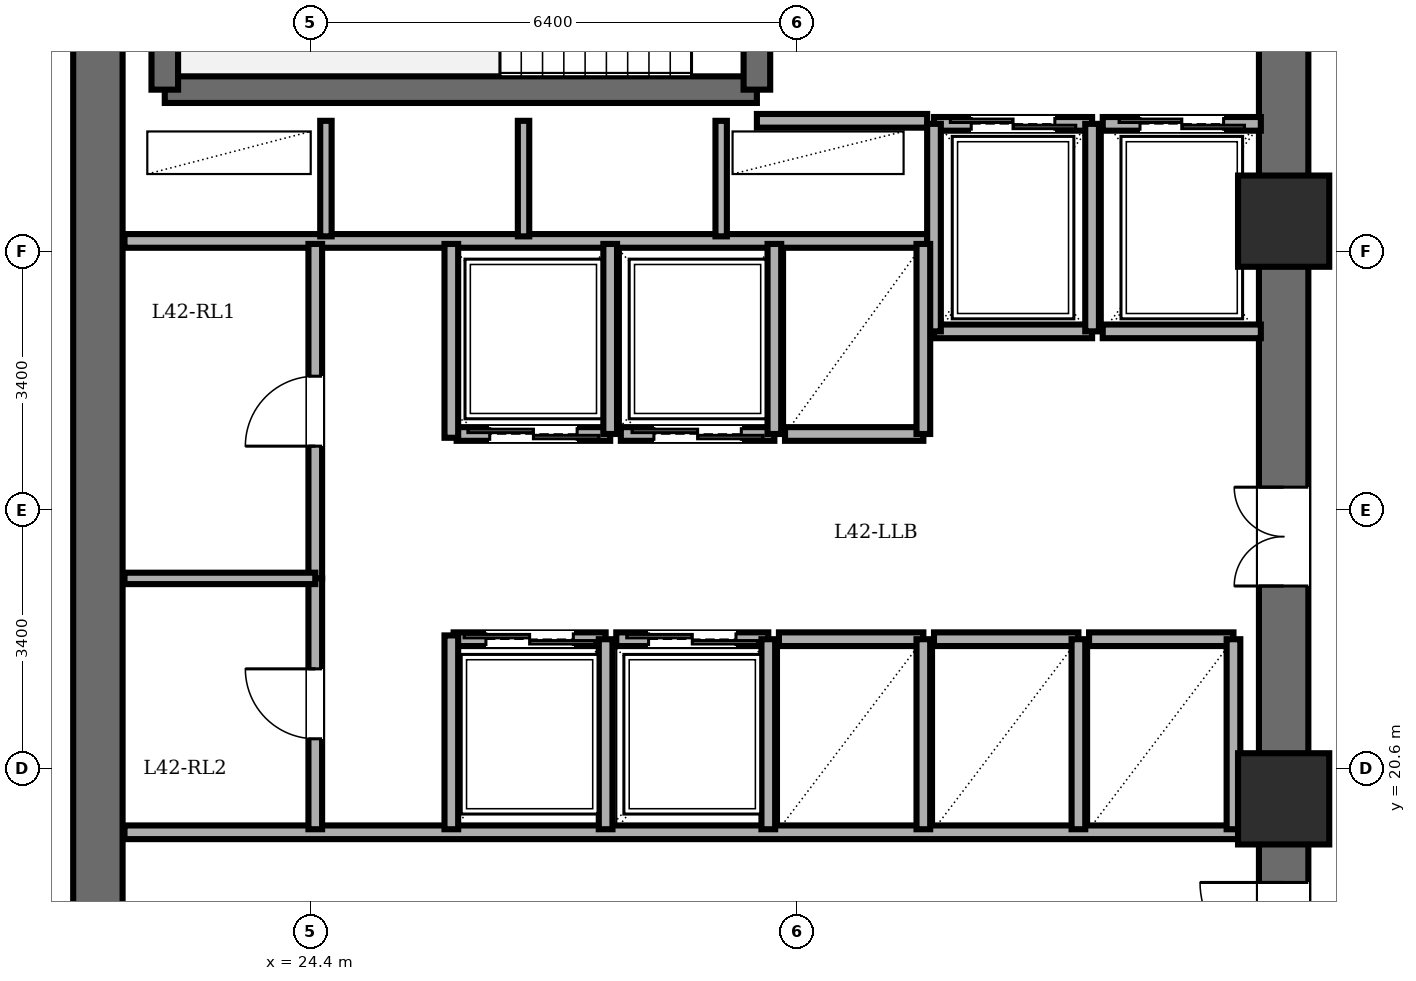
"""IFC4 building model, lengths in metres.
Left out: names, types, materials, properties, quantities, classifications, styles, units other than length and angle.
Written with IfcOpenShell. Run it as: python <this file> out.ifc"""

import sys

from ifc_helpers import new_model, si_unit, direction, frame, frame_2d, origin, origin_2d, place, context, subcontext, project, spatial, rectangle, extrude, element, fill, save


model = new_model("IFC4")
c1 = context("Model", 3, precision=1e-05, world=origin(), true_north=direction((0.0, 1.0)))
c2 = subcontext(c1, "Body", "Model", "MODEL_VIEW")
j1 = project(units=[si_unit("LENGTHUNIT", "METRE"), si_unit("PLANEANGLEUNIT", "RADIAN")], contexts=[c1])
p1 = place(None, origin())
s1 = spatial("IfcSite", under=j1, at=p1, CompositionType="ELEMENT")
p2 = place(p1, origin())
s2 = spatial("IfcBuilding", under=s1, at=p2, CompositionType="ELEMENT")
p3 = place(p2, frame((0.0, 0.0, 161.8)))
s3 = spatial("IfcBuildingStorey", under=s2, at=p3, CompositionType="ELEMENT", Elevation=161.8)
for number, where, z_axis, x_axis in (
    (1, (37.2, 20.2, 0.0), (0.0, 0.0, 1.0), (1.0, 0.0, 0.0)),
    (2, (37.2, 27.8, 0.0), (0.0, 0.0, 1.0), (1.0, 0.0, 0.0)),
):
    element("IfcColumn", number, at=place(p3, frame(where, z_axis=z_axis, x_axis=x_axis)), inside=s3, PredefinedType="COLUMN", context=c2, shape_type="SweptSolid", body=[
        extrude(rectangle(XDim=1.2, YDim=1.2, at=origin_2d()), origin(), (0.0, 0.0, 1.0), 3.6),
    ])
p4 = place(p3, frame((21.6, 14.4, 0.0), z_axis=(0.0, 0.0, 1.0), x_axis=(0.0, 1.0, 0.0)))
e3 = element("IfcWall", 3, at=p4, inside=s3, PredefinedType="SHEAR", context=c2, shape_type="SweptSolid", body=[
    extrude(rectangle(XDim=19.2, YDim=0.65, at=frame_2d((9.6, 0.0))), origin(), (0.0, 0.0, 1.0), 3.4),
])
p5 = place(p3, frame((37.2, 14.4, 0.0), z_axis=(0.0, 0.0, 1.0), x_axis=(0.0, 1.0, 0.0)))
e4 = element("IfcWall", 4, at=p5, inside=s3, PredefinedType="SHEAR", context=c2, shape_type="SweptSolid", body=[
    extrude(rectangle(XDim=19.2, YDim=0.65, at=frame_2d((9.6, 0.0))), origin(), (0.0, 0.0, 1.0), 3.4),
])
p6 = place(p5, frame((15.8, 0.0, 0.0)))
e5 = element("IfcOpeningElement", 5, at=p6, cuts=e4, PredefinedType="OPENING", context=c2, shape_type="SweptSolid", body=[
    extrude(rectangle(XDim=1.15, YDim=2.15, at=frame_2d((0.575, 1.075))), frame((0.0, 0.335, 0.0), z_axis=(0.0, -1.0, 0.0), x_axis=(1.0, 0.0, 0.0)), (0.0, 0.0, 1.0), 0.67),
])
p7 = place(p5, frame((3.6, 0.0, 0.0)))
e6 = element("IfcOpeningElement", 6, at=p7, cuts=e4, PredefinedType="OPENING", context=c2, shape_type="SweptSolid", body=[
    extrude(rectangle(XDim=1.1, YDim=2.15, at=frame_2d((0.55, 1.075))), frame((0.0, 0.335, 0.0), z_axis=(0.0, -1.0, 0.0), x_axis=(1.0, 0.0, 0.0)), (0.0, 0.0, 1.0), 0.67),
])
p8 = place(p5, frame((8.6, 0.0, 0.0)))
e7 = element("IfcOpeningElement", 7, at=p8, cuts=e4, PredefinedType="OPENING", context=c2, shape_type="SweptSolid", body=[
    extrude(rectangle(XDim=1.3, YDim=2.2, at=frame_2d((0.65, 1.1))), frame((0.0, 0.335, 0.0), z_axis=(0.0, -1.0, 0.0), x_axis=(1.0, 0.0, 0.0)), (0.0, 0.0, 1.0), 0.67),
])
p9 = place(p3, frame((22.48, 29.53, 0.0), z_axis=(0.0, 0.0, 1.0), x_axis=(1.0, 0.0, 0.0)))
e8 = element("IfcWall", 8, at=p9, inside=s3, PredefinedType="SOLIDWALL", context=c2, shape_type="SweptSolid", body=[
    extrude(rectangle(XDim=7.79, YDim=0.35, at=frame_2d((3.895, 0.0))), origin(), (0.0, 0.0, 1.0), 3.4),
])
p10 = place(p3, frame((22.48, 29.53, 0.0), z_axis=(0.0, 0.0, 1.0), x_axis=(0.0, 1.0, 0.0)))
e9 = element("IfcWall", 9, at=p10, inside=s3, PredefinedType="SOLIDWALL", context=c2, shape_type="SweptSolid", body=[
    extrude(rectangle(XDim=3.58, YDim=0.35, at=frame_2d((1.79, 0.0))), origin(), (0.0, 0.0, 1.0), 3.4),
])
p11 = place(p3, frame((30.27, 29.53, 0.0), z_axis=(0.0, 0.0, 1.0), x_axis=(0.0, 1.0, 0.0)))
e10 = element("IfcWall", 10, at=p11, inside=s3, PredefinedType="SOLIDWALL", context=c2, shape_type="SweptSolid", body=[
    extrude(rectangle(XDim=3.58, YDim=0.35, at=frame_2d((1.79, 0.0))), origin(), (0.0, 0.0, 1.0), 3.4),
])
p12 = place(p11, frame((1.25, 0.0, 0.0)))
e11 = element("IfcOpeningElement", 11, at=p12, cuts=e10, PredefinedType="OPENING", context=c2, shape_type="SweptSolid", body=[
    extrude(rectangle(XDim=1.1, YDim=2.15, at=frame_2d((0.55, 1.075))), frame((0.0, 0.185, 0.0), z_axis=(0.0, -1.0, 0.0), x_axis=(1.0, 0.0, 0.0)), (0.0, 0.0, 1.0), 0.37),
])
p13 = place(p3, frame((30.27, 29.12, 0.0), z_axis=(0.0, 0.0, 1.0), x_axis=(1.0, 0.0, 0.0)))
e12 = element("IfcWall", 12, at=p13, inside=s3, PredefinedType="PARTITIONING", context=c2, shape_type="SweptSolid", body=[
    extrude(rectangle(XDim=2.24, YDim=0.18, at=frame_2d((1.12, 0.0))), origin(), (0.0, 0.0, 1.0), 3.4),
])
p14 = place(p3, frame((21.95, 27.54, 0.0), z_axis=(0.0, 0.0, 1.0), x_axis=(1.0, 0.0, 0.0)))
e13 = element("IfcWall", 13, at=p14, inside=s3, PredefinedType="PARTITIONING", context=c2, shape_type="SweptSolid", body=[
    extrude(rectangle(XDim=10.56, YDim=0.18, at=frame_2d((5.28, 0.0))), origin(), (0.0, 0.0, 1.0), 3.4),
])
for number, where, z_axis, x_axis in (
    (14, (24.6, 27.6, 0.0), (0.0, 0.0, 1.0), (0.0, 1.0, 0.0)),
    (15, (27.2, 27.6, 0.0), (0.0, 0.0, 1.0), (0.0, 1.0, 0.0)),
    (16, (29.8, 27.6, 0.0), (0.0, 0.0, 1.0), (0.0, 1.0, 0.0)),
):
    element("IfcWall", number, at=place(p3, frame(where, z_axis=z_axis, x_axis=x_axis)), inside=s3, PredefinedType="PARTITIONING", context=c2, shape_type="SweptSolid", body=[
        extrude(rectangle(XDim=1.52, YDim=0.15, at=frame_2d((0.76, 0.0))), origin(), (0.0, 0.0, 1.0), 3.4),
    ])
p15 = place(p3, frame((21.95, 19.76, 0.0), z_axis=(0.0, 0.0, 1.0), x_axis=(1.0, 0.0, 0.0)))
e17 = element("IfcWall", 17, at=p15, inside=s3, PredefinedType="PARTITIONING", context=c2, shape_type="SweptSolid", body=[
    extrude(rectangle(XDim=14.87, YDim=0.18, at=frame_2d((7.435, 0.0))), origin(), (0.0, 0.0, 1.0), 3.4),
])
p16 = place(p3, frame((32.6, 29.08, 0.0), z_axis=(0.0, 0.0, 1.0), x_axis=(1.0, 0.0, 0.0)))
e18 = element("IfcWall", 18, at=p16, inside=s3, PredefinedType="PARTITIONING", context=c2, shape_type="SweptSolid", body=[
    extrude(rectangle(XDim=2.08, YDim=0.18, at=frame_2d((1.04, 0.0))), origin(), (0.0, 0.0, 1.0), 3.4),
])
p17 = place(p16, frame((0.49, 0.0, 0.0)))
e19 = element("IfcOpeningElement", 19, at=p17, cuts=e18, PredefinedType="OPENING", context=c2, shape_type="SweptSolid", body=[
    extrude(rectangle(XDim=1.1, YDim=2.2, at=frame_2d((0.55, 1.1))), frame((0.0, 0.1, 0.0), z_axis=(0.0, -1.0, 0.0), x_axis=(1.0, 0.0, 0.0)), (0.0, 0.0, 1.0), 0.2),
])
p18 = place(p3, frame((34.68, 26.35, 0.0), z_axis=(0.0, 0.0, 1.0), x_axis=(-1.0, 0.0, 0.0)))
e20 = element("IfcWall", 20, at=p18, inside=s3, PredefinedType="PARTITIONING", context=c2, shape_type="SweptSolid", body=[
    extrude(rectangle(XDim=2.08, YDim=0.18, at=frame_2d((1.04, 0.0))), origin(), (0.0, 0.0, 1.0), 3.4),
])
for number, where, z_axis, x_axis in (
    (21, (34.68, 26.35, 0.0), (0.0, 0.0, 1.0), (0.0, 1.0, 0.0)),
    (22, (32.6, 29.08, 0.0), (0.0, 0.0, 1.0), (0.0, -1.0, 0.0)),
):
    element("IfcWall", number, at=place(p3, frame(where, z_axis=z_axis, x_axis=x_axis)), inside=s3, PredefinedType="PARTITIONING", context=c2, shape_type="SweptSolid", body=[
        extrude(rectangle(XDim=2.73, YDim=0.18, at=frame_2d((1.365, 0.0))), origin(), (0.0, 0.0, 1.0), 3.4),
    ])
p19 = place(p3, frame((34.82, 29.08, 0.0), z_axis=(0.0, 0.0, 1.0), x_axis=(1.0, 0.0, 0.0)))
e23 = element("IfcWall", 23, at=p19, inside=s3, PredefinedType="PARTITIONING", context=c2, shape_type="SweptSolid", body=[
    extrude(rectangle(XDim=2.08, YDim=0.18, at=frame_2d((1.04, 0.0))), origin(), (0.0, 0.0, 1.0), 3.4),
])
p20 = place(p19, frame((0.49, 0.0, 0.0)))
e24 = element("IfcOpeningElement", 24, at=p20, cuts=e23, PredefinedType="OPENING", context=c2, shape_type="SweptSolid", body=[
    extrude(rectangle(XDim=1.1, YDim=2.2, at=frame_2d((0.55, 1.1))), frame((0.0, 0.1, 0.0), z_axis=(0.0, -1.0, 0.0), x_axis=(1.0, 0.0, 0.0)), (0.0, 0.0, 1.0), 0.2),
])
p21 = place(p3, frame((36.9, 26.35, 0.0), z_axis=(0.0, 0.0, 1.0), x_axis=(-1.0, 0.0, 0.0)))
e25 = element("IfcWall", 25, at=p21, inside=s3, PredefinedType="PARTITIONING", context=c2, shape_type="SweptSolid", body=[
    extrude(rectangle(XDim=2.08, YDim=0.18, at=frame_2d((1.04, 0.0))), origin(), (0.0, 0.0, 1.0), 3.4),
])
p22 = place(p3, frame((28.34, 25.0, 0.0), z_axis=(0.0, 0.0, 1.0), x_axis=(-1.0, 0.0, 0.0)))
e26 = element("IfcWall", 26, at=p22, inside=s3, PredefinedType="PARTITIONING", context=c2, shape_type="SweptSolid", body=[
    extrude(rectangle(XDim=2.02, YDim=0.18, at=frame_2d((1.01, 0.0))), origin(), (0.0, 0.0, 1.0), 3.4),
])
p23 = place(p22, frame((0.435, 0.0, 0.0)))
e27 = element("IfcOpeningElement", 27, at=p23, cuts=e26, PredefinedType="OPENING", context=c2, shape_type="SweptSolid", body=[
    extrude(rectangle(XDim=1.15, YDim=2.2, at=frame_2d((0.575, 1.1))), frame((0.0, 0.1, 0.0), z_axis=(0.0, -1.0, 0.0), x_axis=(1.0, 0.0, 0.0)), (0.0, 0.0, 1.0), 0.2),
])
p24 = place(p3, frame((28.34, 25.0, 0.0), z_axis=(0.0, 0.0, 1.0), x_axis=(0.0, 1.0, 0.0)))
e28 = element("IfcWall", 28, at=p24, inside=s3, PredefinedType="PARTITIONING", context=c2, shape_type="SweptSolid", body=[
    extrude(rectangle(XDim=2.5, YDim=0.18, at=frame_2d((1.25, 0.0))), origin(), (0.0, 0.0, 1.0), 3.4),
])
p25 = place(p3, frame((30.5, 25.0, 0.0), z_axis=(0.0, 0.0, 1.0), x_axis=(-1.0, 0.0, 0.0)))
e29 = element("IfcWall", 29, at=p25, inside=s3, PredefinedType="PARTITIONING", context=c2, shape_type="SweptSolid", body=[
    extrude(rectangle(XDim=2.02, YDim=0.18, at=frame_2d((1.01, 0.0))), origin(), (0.0, 0.0, 1.0), 3.4),
])
p26 = place(p25, frame((0.435, 0.0, 0.0)))
e30 = element("IfcOpeningElement", 30, at=p26, cuts=e29, PredefinedType="OPENING", context=c2, shape_type="SweptSolid", body=[
    extrude(rectangle(XDim=1.15, YDim=2.2, at=frame_2d((0.575, 1.1))), frame((0.0, 0.1, 0.0), z_axis=(0.0, -1.0, 0.0), x_axis=(1.0, 0.0, 0.0)), (0.0, 0.0, 1.0), 0.2),
])
p27 = place(p3, frame((30.5, 25.0, 0.0), z_axis=(0.0, 0.0, 1.0), x_axis=(0.0, 1.0, 0.0)))
e31 = element("IfcWall", 31, at=p27, inside=s3, PredefinedType="PARTITIONING", context=c2, shape_type="SweptSolid", body=[
    extrude(rectangle(XDim=2.5, YDim=0.18, at=frame_2d((1.25, 0.0))), origin(), (0.0, 0.0, 1.0), 3.4),
])
p28 = place(p3, frame((26.28, 22.3, 0.0), z_axis=(0.0, 0.0, 1.0), x_axis=(1.0, 0.0, 0.0)))
e32 = element("IfcWall", 32, at=p28, inside=s3, PredefinedType="PARTITIONING", context=c2, shape_type="SweptSolid", body=[
    extrude(rectangle(XDim=2.0, YDim=0.18, at=frame_2d((1.0, 0.0))), origin(), (0.0, 0.0, 1.0), 3.4),
])
p29 = place(p28, frame((0.425, 0.0, 0.0)))
e33 = element("IfcOpeningElement", 33, at=p29, cuts=e32, PredefinedType="OPENING", context=c2, shape_type="SweptSolid", body=[
    extrude(rectangle(XDim=1.15, YDim=2.2, at=frame_2d((0.575, 1.1))), frame((0.0, 0.1, 0.0), z_axis=(0.0, -1.0, 0.0), x_axis=(1.0, 0.0, 0.0)), (0.0, 0.0, 1.0), 0.2),
])
p30 = place(p3, frame((28.28, 19.8, 0.0), z_axis=(0.0, 0.0, 1.0), x_axis=(0.0, 1.0, 0.0)))
e34 = element("IfcWall", 34, at=p30, inside=s3, PredefinedType="PARTITIONING", context=c2, shape_type="SweptSolid", body=[
    extrude(rectangle(XDim=2.5, YDim=0.18, at=frame_2d((1.25, 0.0))), origin(), (0.0, 0.0, 1.0), 3.4),
])
p31 = place(p3, frame((28.42, 22.3, 0.0), z_axis=(0.0, 0.0, 1.0), x_axis=(1.0, 0.0, 0.0)))
e35 = element("IfcWall", 35, at=p31, inside=s3, PredefinedType="PARTITIONING", context=c2, shape_type="SweptSolid", body=[
    extrude(rectangle(XDim=2.0, YDim=0.18, at=frame_2d((1.0, 0.0))), origin(), (0.0, 0.0, 1.0), 3.4),
])
p32 = place(p31, frame((0.425, 0.0, 0.0)))
e36 = element("IfcOpeningElement", 36, at=p32, cuts=e35, PredefinedType="OPENING", context=c2, shape_type="SweptSolid", body=[
    extrude(rectangle(XDim=1.15, YDim=2.2, at=frame_2d((0.575, 1.1))), frame((0.0, 0.1, 0.0), z_axis=(0.0, -1.0, 0.0), x_axis=(1.0, 0.0, 0.0)), (0.0, 0.0, 1.0), 0.2),
])
p33 = place(p3, frame((30.42, 19.8, 0.0), z_axis=(0.0, 0.0, 1.0), x_axis=(0.0, 1.0, 0.0)))
e37 = element("IfcWall", 37, at=p33, inside=s3, PredefinedType="PARTITIONING", context=c2, shape_type="SweptSolid", body=[
    extrude(rectangle(XDim=2.5, YDim=0.18, at=frame_2d((1.25, 0.0))), origin(), (0.0, 0.0, 1.0), 3.4),
])
p34 = place(p3, frame((32.46, 25.0, 0.0), z_axis=(0.0, 0.0, 1.0), x_axis=(-1.0, 0.0, 0.0)))
e38 = element("IfcWall", 38, at=p34, inside=s3, PredefinedType="PARTITIONING", context=c2, shape_type="SweptSolid", body=[
    extrude(rectangle(XDim=1.82, YDim=0.18, at=frame_2d((0.91, 0.0))), origin(), (0.0, 0.0, 1.0), 3.4),
])
p35 = place(p3, frame((32.46, 25.0, 0.0), z_axis=(0.0, 0.0, 1.0), x_axis=(0.0, 1.0, 0.0)))
e39 = element("IfcWall", 39, at=p35, inside=s3, PredefinedType="PARTITIONING", context=c2, shape_type="SweptSolid", body=[
    extrude(rectangle(XDim=2.5, YDim=0.18, at=frame_2d((1.25, 0.0))), origin(), (0.0, 0.0, 1.0), 3.4),
])
p36 = place(p3, frame((30.56, 22.3, 0.0), z_axis=(0.0, 0.0, 1.0), x_axis=(1.0, 0.0, 0.0)))
e40 = element("IfcWall", 40, at=p36, inside=s3, PredefinedType="PARTITIONING", context=c2, shape_type="SweptSolid", body=[
    extrude(rectangle(XDim=1.9, YDim=0.18, at=frame_2d((0.95, 0.0))), origin(), (0.0, 0.0, 1.0), 3.4),
])
p37 = place(p3, frame((32.46, 19.8, 0.0), z_axis=(0.0, 0.0, 1.0), x_axis=(0.0, 1.0, 0.0)))
e41 = element("IfcWall", 41, at=p37, inside=s3, PredefinedType="PARTITIONING", context=c2, shape_type="SweptSolid", body=[
    extrude(rectangle(XDim=2.5, YDim=0.18, at=frame_2d((1.25, 0.0))), origin(), (0.0, 0.0, 1.0), 3.4),
])
p38 = place(p3, frame((32.6, 22.3, 0.0), z_axis=(0.0, 0.0, 1.0), x_axis=(1.0, 0.0, 0.0)))
e42 = element("IfcWall", 42, at=p38, inside=s3, PredefinedType="PARTITIONING", context=c2, shape_type="SweptSolid", body=[
    extrude(rectangle(XDim=1.9, YDim=0.18, at=frame_2d((0.95, 0.0))), origin(), (0.0, 0.0, 1.0), 3.4),
])
p39 = place(p3, frame((34.5, 19.8, 0.0), z_axis=(0.0, 0.0, 1.0), x_axis=(0.0, 1.0, 0.0)))
e43 = element("IfcWall", 43, at=p39, inside=s3, PredefinedType="PARTITIONING", context=c2, shape_type="SweptSolid", body=[
    extrude(rectangle(XDim=2.5, YDim=0.18, at=frame_2d((1.25, 0.0))), origin(), (0.0, 0.0, 1.0), 3.4),
])
p40 = place(p3, frame((34.64, 22.3, 0.0), z_axis=(0.0, 0.0, 1.0), x_axis=(1.0, 0.0, 0.0)))
e44 = element("IfcWall", 44, at=p40, inside=s3, PredefinedType="PARTITIONING", context=c2, shape_type="SweptSolid", body=[
    extrude(rectangle(XDim=1.9, YDim=0.18, at=frame_2d((0.95, 0.0))), origin(), (0.0, 0.0, 1.0), 3.4),
])
p41 = place(p3, frame((36.54, 19.8, 0.0), z_axis=(0.0, 0.0, 1.0), x_axis=(0.0, 1.0, 0.0)))
e45 = element("IfcWall", 45, at=p41, inside=s3, PredefinedType="PARTITIONING", context=c2, shape_type="SweptSolid", body=[
    extrude(rectangle(XDim=2.5, YDim=0.18, at=frame_2d((1.25, 0.0))), origin(), (0.0, 0.0, 1.0), 3.4),
])
p42 = place(p3, frame((24.46, 23.1, 0.0), z_axis=(0.0, 0.0, 1.0), x_axis=(0.0, 1.0, 0.0)))
e46 = element("IfcWall", 46, at=p42, inside=s3, PredefinedType="PARTITIONING", context=c2, shape_type="SweptSolid", body=[
    extrude(rectangle(XDim=4.4, YDim=0.18, at=frame_2d((2.2, 0.0))), origin(), (0.0, 0.0, 1.0), 3.4),
])
p43 = place(p42, frame((1.74, 0.0, 0.0)))
e47 = element("IfcOpeningElement", 47, at=p43, cuts=e46, PredefinedType="OPENING", context=c2, shape_type="SweptSolid", body=[
    extrude(rectangle(XDim=0.92, YDim=2.1, at=frame_2d((0.46, 1.05))), frame((0.0, 0.1, 0.0), z_axis=(0.0, -1.0, 0.0), x_axis=(1.0, 0.0, 0.0)), (0.0, 0.0, 1.0), 0.2),
])
p44 = place(p3, frame((24.46, 19.8, 0.0), z_axis=(0.0, 0.0, 1.0), x_axis=(0.0, 1.0, 0.0)))
e48 = element("IfcWall", 48, at=p44, inside=s3, PredefinedType="PARTITIONING", context=c2, shape_type="SweptSolid", body=[
    extrude(rectangle(XDim=3.3, YDim=0.18, at=frame_2d((1.65, 0.0))), origin(), (0.0, 0.0, 1.0), 3.4),
])
p45 = place(p44, frame((1.19, 0.0, 0.0)))
e49 = element("IfcOpeningElement", 49, at=p45, cuts=e48, PredefinedType="OPENING", context=c2, shape_type="SweptSolid", body=[
    extrude(rectangle(XDim=0.92, YDim=2.1, at=frame_2d((0.46, 1.05))), frame((0.0, 0.1, 0.0), z_axis=(0.0, -1.0, 0.0), x_axis=(1.0, 0.0, 0.0)), (0.0, 0.0, 1.0), 0.2),
])
p46 = place(p3, frame((21.95, 23.1, 0.0), z_axis=(0.0, 0.0, 1.0), x_axis=(1.0, 0.0, 0.0)))
e50 = element("IfcWall", 50, at=p46, inside=s3, PredefinedType="PARTITIONING", context=c2, shape_type="SweptSolid", body=[
    extrude(rectangle(XDim=2.51, YDim=0.15, at=frame_2d((1.255, 0.0))), origin(), (0.0, 0.0, 1.0), 3.4),
])
for number, where, z_axis, x_axis in (
    (51, (26.25, 24.95, 0.0), (0.0, 0.0, 1.0), (0.0, 1.0, 0.0)),
    (52, (26.25, 19.8, 0.0), (0.0, 0.0, 1.0), (0.0, 1.0, 0.0)),
):
    element("IfcWall", number, at=place(p3, frame(where, z_axis=z_axis, x_axis=x_axis)), inside=s3, PredefinedType="PARTITIONING", context=c2, shape_type="SweptSolid", body=[
        extrude(rectangle(XDim=2.55, YDim=0.18, at=frame_2d((1.275, 0.0))), origin(), (0.0, 0.0, 1.0), 3.4),
    ])
p47 = place(p7, origin())
e53 = element("IfcDoor", 53, at=p47, inside=s3, OperationType="SINGLE_SWING_RIGHT", PredefinedType="DOOR", context=c2, shape_type="SweptSolid", body=[
    extrude(rectangle(XDim=1.1, YDim=2.15, at=frame_2d((0.55, 1.075))), frame((0.0, 0.025, 0.0), z_axis=(0.0, -1.0, 0.0), x_axis=(1.0, 0.0, 0.0)), (0.0, 0.0, 1.0), 0.05),
])
fill(e6, e53)
p48 = place(p17, origin())
e54 = element("IfcDoor", 54, at=p48, inside=s3, OperationType="DOUBLE_DOOR_SLIDING", PredefinedType="DOOR", context=c2, shape_type="SweptSolid", body=[
    extrude(rectangle(XDim=1.1, YDim=2.2, at=frame_2d((0.55, 1.1))), frame((0.0, 0.025, 0.0), z_axis=(0.0, -1.0, 0.0), x_axis=(1.0, 0.0, 0.0)), (0.0, 0.0, 1.0), 0.05),
])
fill(e19, e54)
p49 = place(p20, origin())
e55 = element("IfcDoor", 55, at=p49, inside=s3, OperationType="DOUBLE_DOOR_SLIDING", PredefinedType="DOOR", context=c2, shape_type="SweptSolid", body=[
    extrude(rectangle(XDim=1.1, YDim=2.2, at=frame_2d((0.55, 1.1))), frame((0.0, 0.025, 0.0), z_axis=(0.0, -1.0, 0.0), x_axis=(1.0, 0.0, 0.0)), (0.0, 0.0, 1.0), 0.05),
])
fill(e24, e55)
p50 = place(p23, origin())
e56 = element("IfcDoor", 56, at=p50, inside=s3, OperationType="DOUBLE_DOOR_SLIDING", PredefinedType="DOOR", context=c2, shape_type="SweptSolid", body=[
    extrude(rectangle(XDim=1.15, YDim=2.2, at=frame_2d((0.575, 1.1))), frame((0.0, 0.025, 0.0), z_axis=(0.0, -1.0, 0.0), x_axis=(1.0, 0.0, 0.0)), (0.0, 0.0, 1.0), 0.05),
])
fill(e27, e56)
p51 = place(p26, origin())
e57 = element("IfcDoor", 57, at=p51, inside=s3, OperationType="DOUBLE_DOOR_SLIDING", PredefinedType="DOOR", context=c2, shape_type="SweptSolid", body=[
    extrude(rectangle(XDim=1.15, YDim=2.2, at=frame_2d((0.575, 1.1))), frame((0.0, 0.025, 0.0), z_axis=(0.0, -1.0, 0.0), x_axis=(1.0, 0.0, 0.0)), (0.0, 0.0, 1.0), 0.05),
])
fill(e30, e57)
p52 = place(p29, origin())
e58 = element("IfcDoor", 58, at=p52, inside=s3, OperationType="DOUBLE_DOOR_SLIDING", PredefinedType="DOOR", context=c2, shape_type="SweptSolid", body=[
    extrude(rectangle(XDim=1.15, YDim=2.2, at=frame_2d((0.575, 1.1))), frame((0.0, 0.025, 0.0), z_axis=(0.0, -1.0, 0.0), x_axis=(1.0, 0.0, 0.0)), (0.0, 0.0, 1.0), 0.05),
])
fill(e33, e58)
p53 = place(p32, origin())
e59 = element("IfcDoor", 59, at=p53, inside=s3, OperationType="DOUBLE_DOOR_SLIDING", PredefinedType="DOOR", context=c2, shape_type="SweptSolid", body=[
    extrude(rectangle(XDim=1.15, YDim=2.2, at=frame_2d((0.575, 1.1))), frame((0.0, 0.025, 0.0), z_axis=(0.0, -1.0, 0.0), x_axis=(1.0, 0.0, 0.0)), (0.0, 0.0, 1.0), 0.05),
])
fill(e36, e59)
p54 = place(p43, origin())
e60 = element("IfcDoor", 60, at=p54, inside=s3, OperationType="SINGLE_SWING_LEFT", PredefinedType="DOOR", context=c2, shape_type="SweptSolid", body=[
    extrude(rectangle(XDim=0.92, YDim=2.1, at=frame_2d((0.46, 1.05))), frame((0.0, 0.025, 0.0), z_axis=(0.0, -1.0, 0.0), x_axis=(1.0, 0.0, 0.0)), (0.0, 0.0, 1.0), 0.05),
])
fill(e47, e60)
p55 = place(p45, origin())
e61 = element("IfcDoor", 61, at=p55, inside=s3, OperationType="SINGLE_SWING_RIGHT", PredefinedType="DOOR", context=c2, shape_type="SweptSolid", body=[
    extrude(rectangle(XDim=0.92, YDim=2.1, at=frame_2d((0.46, 1.05))), frame((0.0, 0.025, 0.0), z_axis=(0.0, -1.0, 0.0), x_axis=(1.0, 0.0, 0.0)), (0.0, 0.0, 1.0), 0.05),
])
fill(e49, e61)
p56 = place(p8, origin())
e62 = element("IfcDoor", 62, at=p56, inside=s3, OperationType="DOUBLE_DOOR_SINGLE_SWING", PredefinedType="DOOR", context=c2, shape_type="SweptSolid", body=[
    extrude(rectangle(XDim=1.3, YDim=2.2, at=frame_2d((0.65, 1.1))), frame((0.0, 0.025, 0.0), z_axis=(0.0, -1.0, 0.0), x_axis=(1.0, 0.0, 0.0)), (0.0, 0.0, 1.0), 0.05),
])
fill(e7, e62)
save(model, sys.argv[1])
